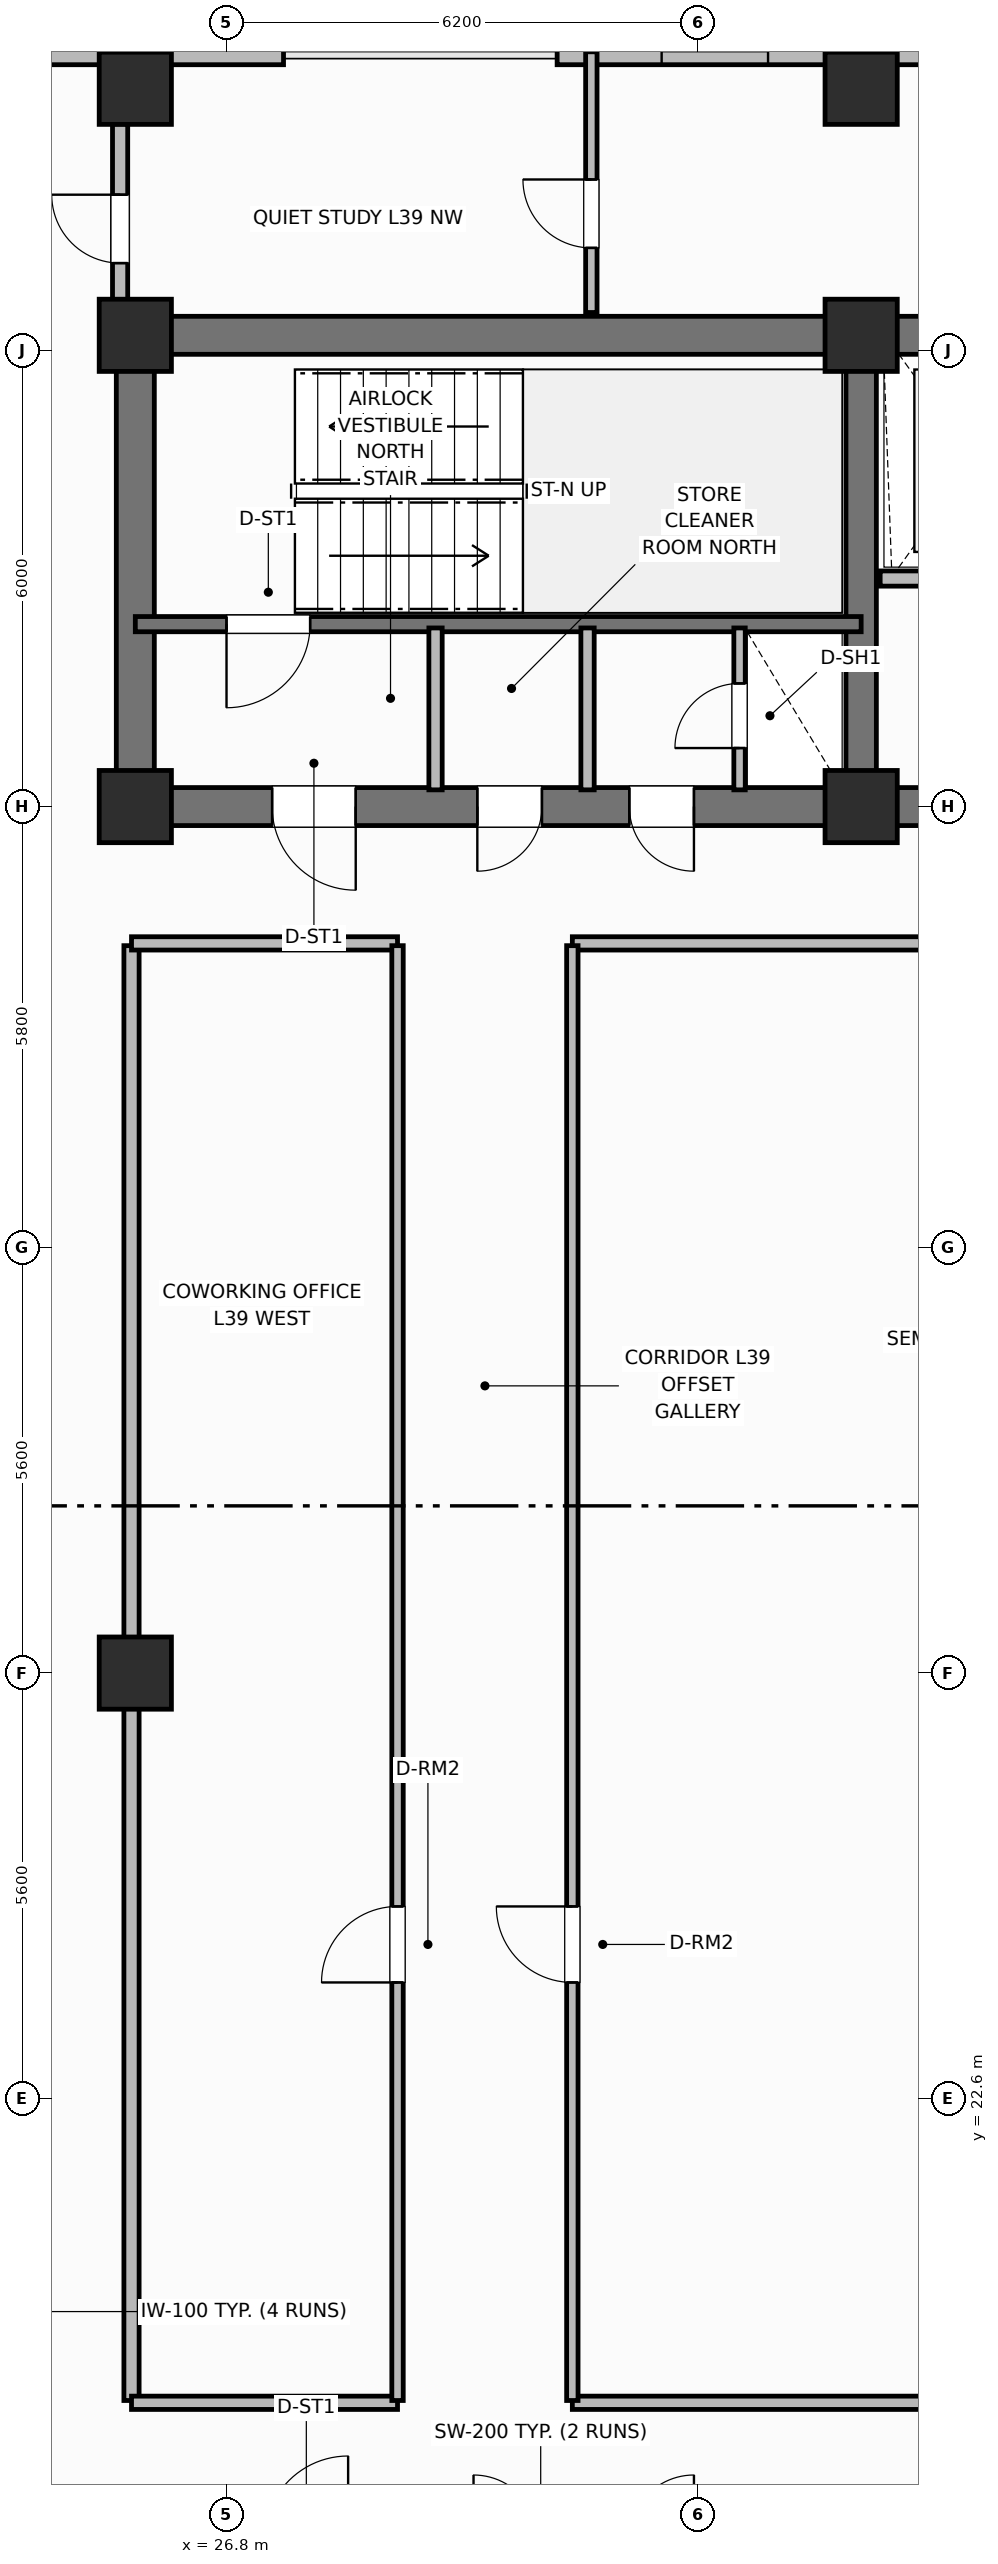
"""IFC4 building model, lengths in metres.
Left out: names, types, materials, properties, quantities, classifications, styles, units other than length and angle.
Written with IfcOpenShell. Run it as: python <this file> out.ifc"""

import sys

from ifc_helpers import new_model, si_unit, direction, frame, frame_2d, origin, origin_2d, place, context, subcontext, project, spatial, rectangle, extrude, element, fill, save


model = new_model("IFC4")
c1 = context("Model", 3, precision=1e-05, world=origin(), true_north=direction((0.0, 1.0)))
c2 = subcontext(c1, "Body", "Model", "MODEL_VIEW")
j1 = project(units=[si_unit("LENGTHUNIT", "METRE"), si_unit("PLANEANGLEUNIT", "RADIAN")], contexts=[c1])
p1 = place(None, origin())
s1 = spatial("IfcSite", under=j1, at=p1, CompositionType="ELEMENT")
p2 = place(p1, origin())
s2 = spatial("IfcBuilding", under=s1, at=p2, CompositionType="ELEMENT")
p3 = place(p2, frame((0.0, 0.0, 158.9)))
s3 = spatial("IfcBuildingStorey", under=s2, at=p3, CompositionType="ELEMENT", Elevation=158.9)
p4 = place(p3, frame((25.6, 45.8, 0.0), z_axis=(0.0, 0.0, 1.0), x_axis=(1.0, 0.0, 0.0)))
e1 = element("IfcWall", 1, at=p4, inside=s3, PredefinedType="SHEAR", context=c2, shape_type="SweptSolid", body=[
    extrude(rectangle(XDim=27.2, YDim=0.5, at=frame_2d((13.6, 0.0))), origin(), (0.0, 0.0, 1.0), 3.7),
])
p5 = place(p3, frame((25.6, 39.85, 0.0), z_axis=(0.0, 0.0, 1.0), x_axis=(0.0, 1.0, 0.0)))
e2 = element("IfcWall", 2, at=p5, inside=s3, PredefinedType="SHEAR", context=c2, shape_type="SweptSolid", body=[
    extrude(rectangle(XDim=5.7, YDim=0.5, at=frame_2d((2.85, 0.0))), origin(), (0.0, 0.0, 1.0), 3.7),
])
p6 = place(p3, frame((52.8, 39.6, 0.0), z_axis=(0.0, 0.0, 1.0), x_axis=(-1.0, 0.0, 0.0)))
e3 = element("IfcWall", 3, at=p6, inside=s3, PredefinedType="SHEAR", context=c2, shape_type="SweptSolid", body=[
    extrude(rectangle(XDim=27.2, YDim=0.5, at=frame_2d((13.6, 0.0))), origin(), (0.0, 0.0, 1.0), 3.7),
])
p7 = place(p6, frame((24.3, 0.0, 0.0)))
e4 = element("IfcOpeningElement", 4, at=p7, cuts=e3, PredefinedType="OPENING", context=c2, shape_type="SweptSolid", body=[
    extrude(rectangle(XDim=1.1, YDim=2.15, at=frame_2d((0.55, 1.075))), frame((0.0, 0.26, 0.0), z_axis=(0.0, -1.0, 0.0), x_axis=(1.0, 0.0, 0.0)), (0.0, 0.0, 1.0), 0.52),
])
p8 = place(p6, frame((21.85, 0.0, 0.0)))
e5 = element("IfcOpeningElement", 5, at=p8, cuts=e3, PredefinedType="OPENING", context=c2, shape_type="SweptSolid", body=[
    extrude(rectangle(XDim=0.85, YDim=2.1, at=frame_2d((0.425, 1.05))), frame((0.0, 0.26, 0.0), z_axis=(0.0, -1.0, 0.0), x_axis=(1.0, 0.0, 0.0)), (0.0, 0.0, 1.0), 0.52),
])
p9 = place(p6, frame((19.85, 0.0, 0.0)))
e6 = element("IfcOpeningElement", 6, at=p9, cuts=e3, PredefinedType="OPENING", context=c2, shape_type="SweptSolid", body=[
    extrude(rectangle(XDim=0.85, YDim=2.1, at=frame_2d((0.425, 1.05))), frame((0.0, 0.26, 0.0), z_axis=(0.0, -1.0, 0.0), x_axis=(1.0, 0.0, 0.0)), (0.0, 0.0, 1.0), 0.52),
])
p10 = place(p6, frame((15.1, 0.0, 0.0)))
e7 = element("IfcOpeningElement", 7, at=p10, cuts=e3, PredefinedType="OPENING", context=c2, shape_type="SweptSolid", body=[
    extrude(rectangle(XDim=1.2, YDim=2.15, at=frame_2d((0.6, 1.075))), frame((0.0, 0.26, 0.0), z_axis=(0.0, -1.0, 0.0), x_axis=(1.0, 0.0, 0.0)), (0.0, 0.0, 1.0), 0.52),
])
p11 = place(p6, frame((12.6, 0.0, 0.0)))
e8 = element("IfcOpeningElement", 8, at=p11, cuts=e3, PredefinedType="OPENING", context=c2, shape_type="SweptSolid", body=[
    extrude(rectangle(XDim=0.85, YDim=2.1, at=frame_2d((0.425, 1.05))), frame((0.0, 0.26, 0.0), z_axis=(0.0, -1.0, 0.0), x_axis=(1.0, 0.0, 0.0)), (0.0, 0.0, 1.0), 0.52),
])
p12 = place(p6, frame((10.85, 0.0, 0.0)))
e9 = element("IfcOpeningElement", 9, at=p12, cuts=e3, PredefinedType="OPENING", context=c2, shape_type="SweptSolid", body=[
    extrude(rectangle(XDim=0.85, YDim=2.1, at=frame_2d((0.425, 1.05))), frame((0.0, 0.26, 0.0), z_axis=(0.0, -1.0, 0.0), x_axis=(1.0, 0.0, 0.0)), (0.0, 0.0, 1.0), 0.52),
])
p13 = place(p6, frame((7.35, 0.0, 0.0)))
e10 = element("IfcOpeningElement", 10, at=p13, cuts=e3, PredefinedType="OPENING", context=c2, shape_type="SweptSolid", body=[
    extrude(rectangle(XDim=0.85, YDim=2.1, at=frame_2d((0.425, 1.05))), frame((0.0, 0.26, 0.0), z_axis=(0.0, -1.0, 0.0), x_axis=(1.0, 0.0, 0.0)), (0.0, 0.0, 1.0), 0.52),
])
p14 = place(p6, frame((5.35, 0.0, 0.0)))
e11 = element("IfcOpeningElement", 11, at=p14, cuts=e3, PredefinedType="OPENING", context=c2, shape_type="SweptSolid", body=[
    extrude(rectangle(XDim=0.85, YDim=2.1, at=frame_2d((0.425, 1.05))), frame((0.0, 0.26, 0.0), z_axis=(0.0, -1.0, 0.0), x_axis=(1.0, 0.0, 0.0)), (0.0, 0.0, 1.0), 0.52),
])
p15 = place(p6, frame((2.0, 0.0, 0.0)))
e12 = element("IfcOpeningElement", 12, at=p15, cuts=e3, PredefinedType="OPENING", context=c2, shape_type="SweptSolid", body=[
    extrude(rectangle(XDim=0.85, YDim=2.1, at=frame_2d((0.425, 1.05))), frame((0.0, 0.26, 0.0), z_axis=(0.0, -1.0, 0.0), x_axis=(1.0, 0.0, 0.0)), (0.0, 0.0, 1.0), 0.52),
])
p16 = place(p3, frame((35.15, 39.85, 0.0), z_axis=(0.0, 0.0, 1.0), x_axis=(0.0, 1.0, 0.0)))
e13 = element("IfcWall", 13, at=p16, inside=s3, PredefinedType="SHEAR", context=c2, shape_type="SweptSolid", body=[
    extrude(rectangle(XDim=5.7, YDim=0.4, at=frame_2d((2.85, 0.0))), origin(), (0.0, 0.0, 1.0), 3.7),
])
for number, where, z_axis, x_axis in (
    (14, (25.6, 39.6, 0.0), (0.0, 0.0, 1.0), (1.0, 0.0, 0.0)),
    (15, (25.6, 45.8, 0.0), (0.0, 0.0, 1.0), (1.0, 0.0, 0.0)),
    (16, (35.15, 39.6, 0.0), (0.0, 0.0, 1.0), (1.0, 0.0, 0.0)),
    (17, (35.15, 45.8, 0.0), (0.0, 0.0, 1.0), (1.0, 0.0, 0.0)),
    (18, (25.6, 28.2, 0.0), (0.0, 0.0, 1.0), (1.0, 0.0, 0.0)),
    (19, (25.6, 49.05, 0.0), (0.0, 0.0, 1.0), (1.0, 0.0, 0.0)),
    (20, (35.15, 49.05, 0.0), (0.0, 0.0, 1.0), (1.0, 0.0, 0.0)),
):
    element("IfcColumn", number, at=place(p3, frame(where, z_axis=z_axis, x_axis=x_axis)), inside=s3, PredefinedType="COLUMN", context=c2, shape_type="SweptSolid", body=[
        extrude(rectangle(XDim=0.95, YDim=0.95, at=origin_2d()), origin(), (0.0, 0.0, 1.0), 3.7),
    ])
p17 = place(p3, frame((36.0, 49.53, 0.0), z_axis=(0.0, 0.0, 1.0), x_axis=(-1.0, 0.0, 0.0)))
e21 = element("IfcWall", 21, at=p17, inside=s3, PredefinedType="SOLIDWALL", context=c2, shape_type="SweptSolid", body=[
    extrude(rectangle(XDim=4.85, YDim=0.34, at=frame_2d((2.425, 0.0))), origin(), (0.0, 0.0, 1.0), 2.72),
])
p18 = place(p17, frame((2.075, 0.0, 0.75)))
e22 = element("IfcOpeningElement", 22, at=p18, cuts=e21, PredefinedType="OPENING", context=c2, shape_type="SweptSolid", body=[
    extrude(rectangle(XDim=1.4, YDim=1.85, at=frame_2d((0.7, 0.925))), frame((0.0, 0.18, 0.0), z_axis=(0.0, -1.0, 0.0), x_axis=(1.0, 0.0, 0.0)), (0.0, 0.0, 1.0), 0.36),
])
p19 = place(p3, frame((27.55, 49.53, 0.0), z_axis=(0.0, 0.0, 1.0), x_axis=(-1.0, 0.0, 0.0)))
e23 = element("IfcWall", 23, at=p19, inside=s3, PredefinedType="SOLIDWALL", context=c2, shape_type="SweptSolid", body=[
    extrude(rectangle(XDim=7.35, YDim=0.34, at=frame_2d((3.675, 0.0))), origin(), (0.0, 0.0, 1.0), 2.72),
])
p20 = place(p3, frame((35.15, 42.0, 0.0), z_axis=(0.0, 0.0, 1.0), x_axis=(-1.0, 0.0, 0.0)))
e24 = element("IfcWall", 24, at=p20, inside=s3, PredefinedType="SHEAR", context=c2, shape_type="SweptSolid", body=[
    extrude(rectangle(XDim=9.55, YDim=0.2, at=frame_2d((4.775, 0.0))), origin(), (0.0, 0.0, 1.0), 3.7),
])
p21 = place(p20, frame((7.25, 0.0, 0.0)))
e25 = element("IfcOpeningElement", 25, at=p21, cuts=e24, PredefinedType="OPENING", context=c2, shape_type="SweptSolid", body=[
    extrude(rectangle(XDim=1.1, YDim=2.15, at=frame_2d((0.55, 1.075))), frame((0.0, 0.11, 0.0), z_axis=(0.0, -1.0, 0.0), x_axis=(1.0, 0.0, 0.0)), (0.0, 0.0, 1.0), 0.22),
])
p22 = place(p3, frame((33.55, 39.82, 0.0), z_axis=(0.0, 0.0, 1.0), x_axis=(0.0, 1.0, 0.0)))
e26 = element("IfcWall", 26, at=p22, inside=s3, PredefinedType="PARTITIONING", context=c2, shape_type="SweptSolid", body=[
    extrude(rectangle(XDim=2.13, YDim=0.15, at=frame_2d((1.065, 0.0))), origin(), (0.0, 0.0, 1.0), 2.55),
])
p23 = place(p22, frame((0.55, 0.0, 0.0)))
e27 = element("IfcOpeningElement", 27, at=p23, cuts=e26, PredefinedType="OPENING", context=c2, shape_type="SweptSolid", body=[
    extrude(rectangle(XDim=0.85, YDim=2.05, at=frame_2d((0.425, 1.025))), frame((0.0, 0.085, 0.0), z_axis=(0.0, -1.0, 0.0), x_axis=(1.0, 0.0, 0.0)), (0.0, 0.0, 1.0), 0.17),
])
for number, where, z_axis, x_axis in (
    (28, (29.55, 39.82, 0.0), (0.0, 0.0, 1.0), (0.0, 1.0, 0.0)),
    (29, (31.55, 39.82, 0.0), (0.0, 0.0, 1.0), (0.0, 1.0, 0.0)),
):
    element("IfcWall", number, at=place(p3, frame(where, z_axis=z_axis, x_axis=x_axis)), inside=s3, PredefinedType="PARTITIONING", context=c2, shape_type="SweptSolid", body=[
        extrude(rectangle(XDim=2.13, YDim=0.175, at=frame_2d((1.065, 0.0))), origin(), (0.0, 0.0, 1.0), 2.55),
    ])
p24 = place(p3, frame((37.95, 42.6, 0.0), z_axis=(0.0, 0.0, 1.0), x_axis=(-1.0, 0.0, 0.0)))
e30 = element("IfcWall", 30, at=p24, inside=s3, PredefinedType="PARTITIONING", context=c2, shape_type="SweptSolid", body=[
    extrude(rectangle(XDim=2.55, YDim=0.2, at=frame_2d((1.275, 0.0))), origin(), (0.0, 0.0, 1.0), 2.32),
])
p25 = place(p24, frame((0.75, 0.0, 0.0)))
e31 = element("IfcOpeningElement", 31, at=p25, cuts=e30, PredefinedType="OPENING", context=c2, shape_type="SweptSolid", body=[
    extrude(rectangle(XDim=1.1, YDim=2.15, at=frame_2d((0.55, 1.075))), frame((0.0, 0.11, 0.0), z_axis=(0.0, -1.0, 0.0), x_axis=(1.0, 0.0, 0.0)), (0.0, 0.0, 1.0), 0.22),
])
p26 = place(p3, frame((25.55, 18.63, 0.0), z_axis=(0.0, 0.0, 1.0), x_axis=(0.0, 1.0, 0.0)))
e32 = element("IfcWall", 32, at=p26, inside=s3, PredefinedType="PARTITIONING", context=c2, shape_type="SweptSolid", body=[
    extrude(rectangle(XDim=19.14, YDim=0.2, at=frame_2d((9.57, 0.0))), origin(), (0.0, 0.0, 1.0), 2.55),
])
p27 = place(p3, frame((25.55, 18.6, 0.0), z_axis=(0.0, 0.0, 1.0), x_axis=(1.0, 0.0, 0.0)))
e33 = element("IfcWall", 33, at=p27, inside=s3, PredefinedType="PARTITIONING", context=c2, shape_type="SweptSolid", body=[
    extrude(rectangle(XDim=3.5, YDim=0.175, at=frame_2d((1.75, 0.0))), origin(), (0.0, 0.0, 1.0), 2.55),
])
p28 = place(p3, frame((31.35, 18.6, 0.0), z_axis=(0.0, 0.0, 1.0), x_axis=(1.0, 0.0, 0.0)))
e34 = element("IfcWall", 34, at=p28, inside=s3, PredefinedType="PARTITIONING", context=c2, shape_type="SweptSolid", body=[
    extrude(rectangle(XDim=21.5, YDim=0.175, at=frame_2d((10.75, 0.0))), origin(), (0.0, 0.0, 1.0), 2.55),
])
p29 = place(p3, frame((25.55, 37.8, 0.0), z_axis=(0.0, 0.0, 1.0), x_axis=(1.0, 0.0, 0.0)))
e35 = element("IfcWall", 35, at=p29, inside=s3, PredefinedType="PARTITIONING", context=c2, shape_type="SweptSolid", body=[
    extrude(rectangle(XDim=3.5, YDim=0.175, at=frame_2d((1.75, 0.0))), origin(), (0.0, 0.0, 1.0), 2.55),
])
p30 = place(p3, frame((31.35, 37.8, 0.0), z_axis=(0.0, 0.0, 1.0), x_axis=(1.0, 0.0, 0.0)))
e36 = element("IfcWall", 36, at=p30, inside=s3, PredefinedType="PARTITIONING", context=c2, shape_type="SweptSolid", body=[
    extrude(rectangle(XDim=21.5, YDim=0.175, at=frame_2d((10.75, 0.0))), origin(), (0.0, 0.0, 1.0), 2.55),
])
p31 = place(p3, frame((29.05, 18.63, 0.0), z_axis=(0.0, 0.0, 1.0), x_axis=(0.0, 1.0, 0.0)))
e37 = element("IfcWall", 37, at=p31, inside=s3, PredefinedType="PARTITIONING", context=c2, shape_type="SweptSolid", body=[
    extrude(rectangle(XDim=19.14, YDim=0.15, at=frame_2d((9.57, 0.0))), origin(), (0.0, 0.0, 1.0), 2.55),
])
p32 = place(p31, frame((5.5, 0.0, 0.0)))
e38 = element("IfcOpeningElement", 38, at=p32, cuts=e37, PredefinedType="OPENING", context=c2, shape_type="SweptSolid", body=[
    extrude(rectangle(XDim=1.0, YDim=2.15, at=frame_2d((0.5, 1.075))), frame((0.0, 0.085, 0.0), z_axis=(0.0, -1.0, 0.0), x_axis=(1.0, 0.0, 0.0)), (0.0, 0.0, 1.0), 0.17),
])
p33 = place(p3, frame((31.35, 18.63, 0.0), z_axis=(0.0, 0.0, 1.0), x_axis=(0.0, 1.0, 0.0)))
e39 = element("IfcWall", 39, at=p33, inside=s3, PredefinedType="PARTITIONING", context=c2, shape_type="SweptSolid", body=[
    extrude(rectangle(XDim=19.14, YDim=0.15, at=frame_2d((9.57, 0.0))), origin(), (0.0, 0.0, 1.0), 2.55),
])
p34 = place(p33, frame((5.5, 0.0, 0.0)))
e40 = element("IfcOpeningElement", 40, at=p34, cuts=e39, PredefinedType="OPENING", context=c2, shape_type="SweptSolid", body=[
    extrude(rectangle(XDim=1.0, YDim=2.15, at=frame_2d((0.5, 1.075))), frame((0.0, 0.085, 0.0), z_axis=(0.0, -1.0, 0.0), x_axis=(1.0, 0.0, 0.0)), (0.0, 0.0, 1.0), 0.17),
])
p35 = place(p3, frame((31.6, 46.1, 0.0), z_axis=(0.0, 0.0, 1.0), x_axis=(0.0, 1.0, 0.0)))
e41 = element("IfcWall", 41, at=p35, inside=s3, PredefinedType="PARTITIONING", context=c2, shape_type="SweptSolid", body=[
    extrude(rectangle(XDim=3.43, YDim=0.15, at=frame_2d((1.715, 0.0))), origin(), (0.0, 0.0, 1.0), 2.55),
])
p36 = place(p35, frame((0.85, 0.0, 0.0)))
e42 = element("IfcOpeningElement", 42, at=p36, cuts=e41, PredefinedType="OPENING", context=c2, shape_type="SweptSolid", body=[
    extrude(rectangle(XDim=0.9, YDim=2.1, at=frame_2d((0.45, 1.05))), frame((0.0, 0.085, 0.0), z_axis=(0.0, -1.0, 0.0), x_axis=(1.0, 0.0, 0.0)), (0.0, 0.0, 1.0), 0.17),
])
p37 = place(p3, frame((25.4, 46.1, 0.0), z_axis=(0.0, 0.0, 1.0), x_axis=(0.0, 1.0, 0.0)))
e43 = element("IfcWall", 43, at=p37, inside=s3, PredefinedType="PARTITIONING", context=c2, shape_type="SweptSolid", body=[
    extrude(rectangle(XDim=2.48, YDim=0.2, at=frame_2d((1.24, 0.0))), origin(), (0.0, 0.0, 1.0), 2.55),
])
p38 = place(p37, frame((0.65, 0.0, 0.0)))
e44 = element("IfcOpeningElement", 44, at=p38, cuts=e43, PredefinedType="OPENING", context=c2, shape_type="SweptSolid", body=[
    extrude(rectangle(XDim=0.9, YDim=2.1, at=frame_2d((0.45, 1.05))), frame((0.0, 0.11, 0.0), z_axis=(0.0, -1.0, 0.0), x_axis=(1.0, 0.0, 0.0)), (0.0, 0.0, 1.0), 0.22),
])
p39 = place(p18, origin())
e45 = element("IfcWindow", 45, at=p39, inside=s3, PartitioningType="SINGLE_PANEL", PredefinedType="WINDOW", context=c2, shape_type="SweptSolid", body=[
    extrude(rectangle(XDim=1.4, YDim=1.85, at=frame_2d((0.7, 0.925))), frame((0.0, 0.03, 0.0), z_axis=(0.0, -1.0, 0.0), x_axis=(1.0, 0.0, 0.0)), (0.0, 0.0, 1.0), 0.06),
])
fill(e22, e45)
p40 = place(p21, origin())
e46 = element("IfcDoor", 46, at=p40, inside=s3, OperationType="SINGLE_SWING_RIGHT", PredefinedType="DOOR", context=c2, shape_type="SweptSolid", body=[
    extrude(rectangle(XDim=1.1, YDim=2.15, at=frame_2d((0.55, 1.075))), frame((0.0, 0.025, 0.0), z_axis=(0.0, -1.0, 0.0), x_axis=(1.0, 0.0, 0.0)), (0.0, 0.0, 1.0), 0.05),
])
fill(e25, e46)
p41 = place(p23, origin())
e47 = element("IfcDoor", 47, at=p41, inside=s3, OperationType="SINGLE_SWING_LEFT", PredefinedType="TRAPDOOR", context=c2, shape_type="SweptSolid", body=[
    extrude(rectangle(XDim=0.85, YDim=2.05, at=frame_2d((0.425, 1.025))), frame((0.0, 0.025, 0.0), z_axis=(0.0, -1.0, 0.0), x_axis=(1.0, 0.0, 0.0)), (0.0, 0.0, 1.0), 0.05),
])
fill(e27, e47)
p42 = place(p32, origin())
e48 = element("IfcDoor", 48, at=p42, inside=s3, OperationType="SINGLE_SWING_LEFT", PredefinedType="DOOR", context=c2, shape_type="SweptSolid", body=[
    extrude(rectangle(XDim=1.0, YDim=2.15, at=frame_2d((0.5, 1.075))), frame((0.0, 0.025, 0.0), z_axis=(0.0, -1.0, 0.0), x_axis=(1.0, 0.0, 0.0)), (0.0, 0.0, 1.0), 0.05),
])
fill(e38, e48)
p43 = place(p34, origin())
e49 = element("IfcDoor", 49, at=p43, inside=s3, OperationType="SINGLE_SWING_RIGHT", PredefinedType="DOOR", context=c2, shape_type="SweptSolid", body=[
    extrude(rectangle(XDim=1.0, YDim=2.15, at=frame_2d((0.5, 1.075))), frame((0.0, 0.025, 0.0), z_axis=(0.0, -1.0, 0.0), x_axis=(1.0, 0.0, 0.0)), (0.0, 0.0, 1.0), 0.05),
])
fill(e40, e49)
p44 = place(p36, origin())
e50 = element("IfcDoor", 50, at=p44, inside=s3, OperationType="SINGLE_SWING_RIGHT", PredefinedType="DOOR", context=c2, shape_type="SweptSolid", body=[
    extrude(rectangle(XDim=0.9, YDim=2.1, at=frame_2d((0.45, 1.05))), frame((0.0, 0.025, 0.0), z_axis=(0.0, -1.0, 0.0), x_axis=(1.0, 0.0, 0.0)), (0.0, 0.0, 1.0), 0.05),
])
fill(e42, e50)
p45 = place(p38, origin())
e51 = element("IfcDoor", 51, at=p45, inside=s3, OperationType="SINGLE_SWING_RIGHT", PredefinedType="DOOR", context=c2, shape_type="SweptSolid", body=[
    extrude(rectangle(XDim=0.9, YDim=2.1, at=frame_2d((0.45, 1.05))), frame((0.0, 0.025, 0.0), z_axis=(0.0, -1.0, 0.0), x_axis=(1.0, 0.0, 0.0)), (0.0, 0.0, 1.0), 0.05),
])
fill(e44, e51)
p46 = place(p7, origin())
e52 = element("IfcDoor", 52, at=p46, inside=s3, OperationType="SINGLE_SWING_LEFT", PredefinedType="DOOR", context=c2, shape_type="SweptSolid", body=[
    extrude(rectangle(XDim=1.1, YDim=2.15, at=frame_2d((0.55, 1.075))), frame((0.0, 0.025, 0.0), z_axis=(0.0, -1.0, 0.0), x_axis=(1.0, 0.0, 0.0)), (0.0, 0.0, 1.0), 0.05),
])
fill(e4, e52)
p47 = place(p8, origin())
e53 = element("IfcDoor", 53, at=p47, inside=s3, OperationType="SINGLE_SWING_RIGHT", PredefinedType="DOOR", context=c2, shape_type="SweptSolid", body=[
    extrude(rectangle(XDim=0.85, YDim=2.1, at=frame_2d((0.425, 1.05))), frame((0.0, 0.025, 0.0), z_axis=(0.0, -1.0, 0.0), x_axis=(1.0, 0.0, 0.0)), (0.0, 0.0, 1.0), 0.05),
])
fill(e5, e53)
p48 = place(p9, origin())
e54 = element("IfcDoor", 54, at=p48, inside=s3, OperationType="SINGLE_SWING_LEFT", PredefinedType="DOOR", context=c2, shape_type="SweptSolid", body=[
    extrude(rectangle(XDim=0.85, YDim=2.1, at=frame_2d((0.425, 1.05))), frame((0.0, 0.025, 0.0), z_axis=(0.0, -1.0, 0.0), x_axis=(1.0, 0.0, 0.0)), (0.0, 0.0, 1.0), 0.05),
])
fill(e6, e54)
save(model, sys.argv[1])
